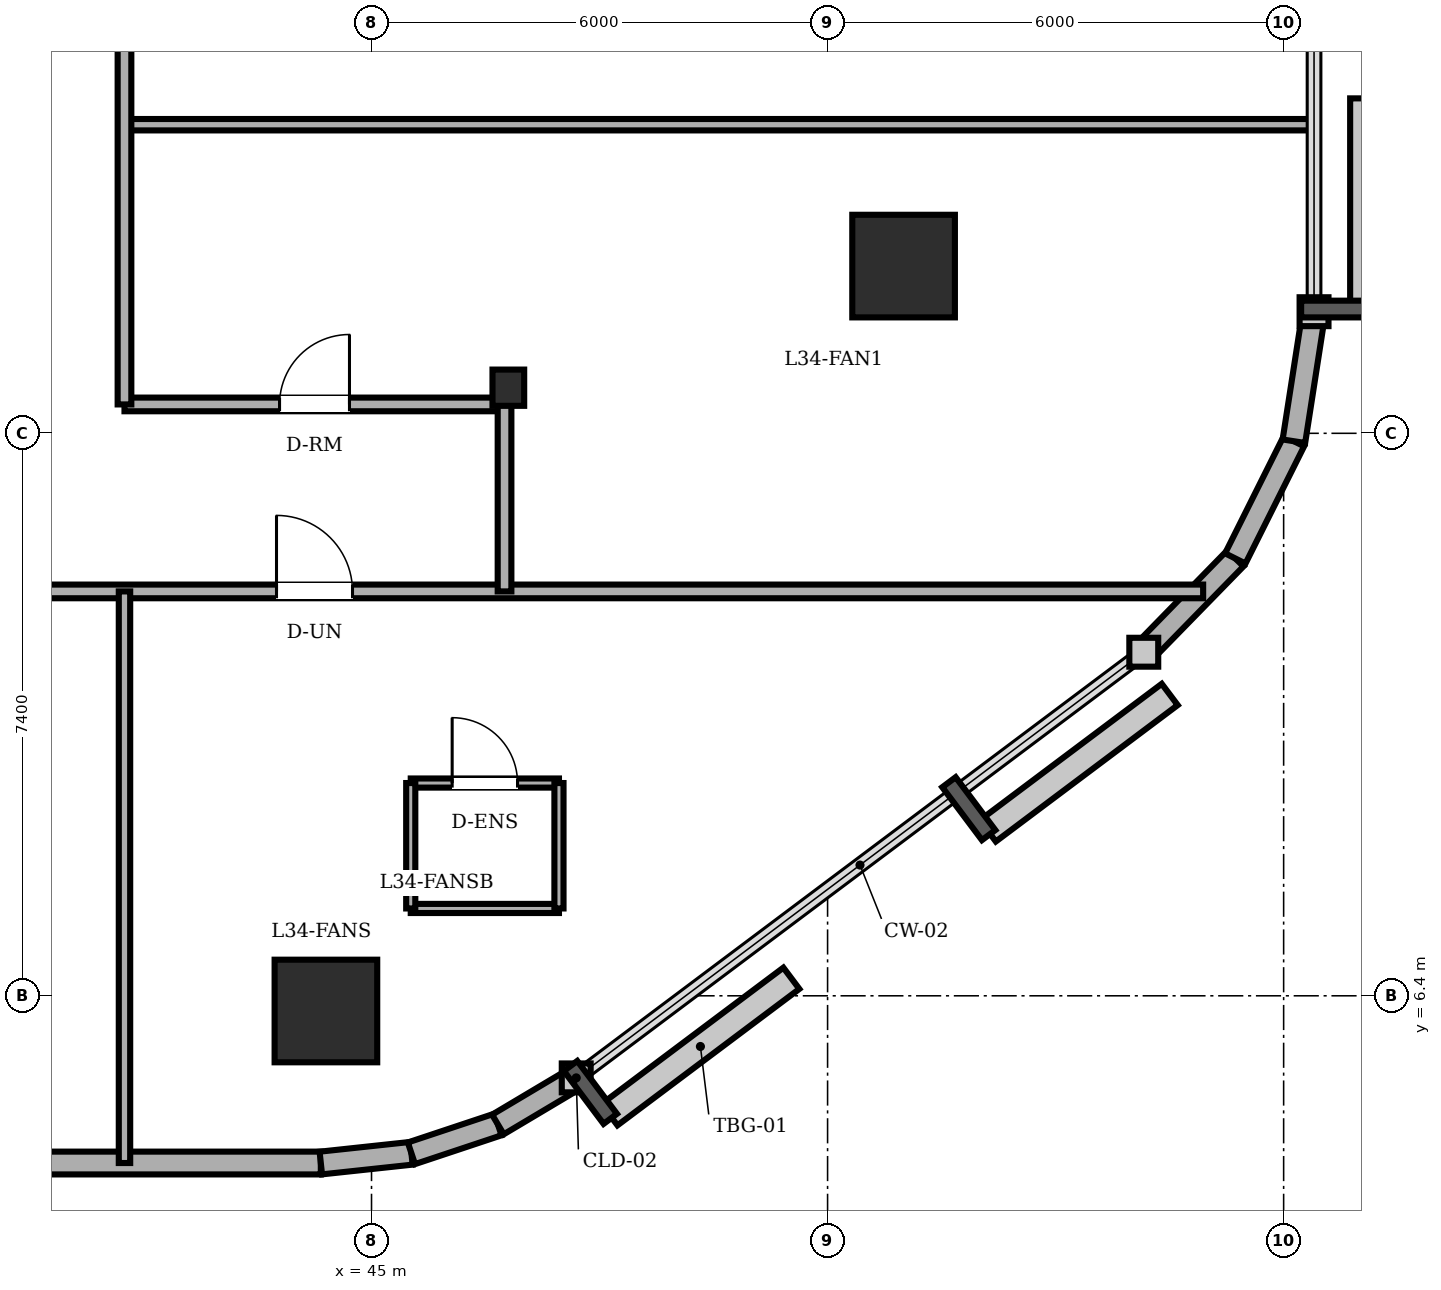
"""IFC4 building model, lengths in metres.
Left out: names, types, materials, properties, quantities, classifications, styles, units other than length and angle.
Written with IfcOpenShell. Run it as: python <this file> out.ifc"""

import sys

from ifc_helpers import new_model, si_unit, direction, frame, frame_2d, origin, origin_2d, place, context, subcontext, project, spatial, rectangle, circle, i_section, extrude, element, fill, save


model = new_model("IFC4")
c1 = context("Model", 3, precision=1e-05, world=origin(), true_north=direction((0.0, 1.0)))
c2 = subcontext(c1, "Body", "Model", "MODEL_VIEW")
j1 = project(units=[si_unit("LENGTHUNIT", "METRE"), si_unit("PLANEANGLEUNIT", "RADIAN")], contexts=[c1])
p1 = place(None, origin())
s1 = spatial("IfcSite", under=j1, at=p1, CompositionType="ELEMENT")
p2 = place(p1, origin())
s2 = spatial("IfcBuilding", under=s1, at=p2, CompositionType="ELEMENT")
p3 = place(p2, frame((0.0, 0.0, 129.5)))
s3 = spatial("IfcBuildingStorey", under=s2, at=p3, CompositionType="ELEMENT", Elevation=129.5)
for number, where, z_axis, x_axis in (
    (1, (44.4, 6.2, 0.0), (0.0, 0.0, 1.0), (1.0, 0.0, 0.0)),
    (2, (52.0, 16.0, 0.0), (0.0, 0.0, 1.0), (1.0, 0.0, 0.0)),
):
    element("IfcColumn", number, at=place(p3, frame(where, z_axis=z_axis, x_axis=x_axis)), inside=s3, PredefinedType="COLUMN", context=c2, shape_type="SweptSolid", body=[
        extrude(circle(Radius=0.675, at=origin_2d()), origin(), (0.0, 0.0, 1.0), 3.6),
    ])
p4 = place(p3, frame((46.8, 14.4, 0.0), z_axis=(0.0, 0.0, 1.0), x_axis=(1.0, 0.0, 0.0)))
e3 = element("IfcColumn", 3, at=p4, inside=s3, PredefinedType="COLUMN", context=c2, shape_type="SweptSolid", body=[
    extrude(i_section(OverallWidth=0.417, OverallDepth=0.477, WebThickness=0.036, FlangeThickness=0.057, FilletRadius=0.015, at=origin_2d()), origin(), (0.0, 0.0, 1.0), 3.6),
])
p5 = place(p3, frame((14.4, 4.2, 0.0), z_axis=(0.0, 0.0, 1.0), x_axis=(1.0, 0.0, 0.0)))
e4 = element("IfcWall", 4, at=p5, inside=s3, PredefinedType="SOLIDWALL", context=c2, shape_type="SweptSolid", body=[
    extrude(rectangle(XDim=29.933, YDim=0.3, at=frame_2d((14.967, 0.0))), origin(), (0.0, 0.0, 1.0), 3.36),
])
p6 = place(p5, frame((5.05, 0.0, 0.0)))
e5 = element("IfcOpeningElement", 5, at=p6, cuts=e4, PredefinedType="OPENING", context=c2, shape_type="SweptSolid", body=[
    extrude(rectangle(XDim=0.95, YDim=2.2, at=frame_2d((0.475, 1.1))), frame((0.0, 0.16, 0.0), z_axis=(0.0, -1.0, 0.0), x_axis=(1.0, 0.0, 0.0)), (0.0, 0.0, 1.0), 0.32),
])
p7 = place(p5, frame((2.808, 0.0, 0.85)))
e6 = element("IfcOpeningElement", 6, at=p7, cuts=e4, PredefinedType="OPENING", context=c2, shape_type="SweptSolid", body=[
    extrude(rectangle(XDim=1.65, YDim=1.55, at=frame_2d((0.825, 0.775))), frame((0.0, 0.16, 0.0), z_axis=(0.0, -1.0, 0.0), x_axis=(1.0, 0.0, 0.0)), (0.0, 0.0, 1.0), 0.32),
])
p8 = place(p5, frame((11.275, 0.0, 0.85)))
e7 = element("IfcOpeningElement", 7, at=p8, cuts=e4, PredefinedType="OPENING", context=c2, shape_type="SweptSolid", body=[
    extrude(rectangle(XDim=1.65, YDim=1.55, at=frame_2d((0.825, 0.775))), frame((0.0, 0.16, 0.0), z_axis=(0.0, -1.0, 0.0), x_axis=(1.0, 0.0, 0.0)), (0.0, 0.0, 1.0), 0.32),
])
p9 = place(p5, frame((17.625, 0.0, 0.85)))
e8 = element("IfcOpeningElement", 8, at=p9, cuts=e4, PredefinedType="OPENING", context=c2, shape_type="SweptSolid", body=[
    extrude(rectangle(XDim=1.65, YDim=1.55, at=frame_2d((0.825, 0.775))), frame((0.0, 0.16, 0.0), z_axis=(0.0, -1.0, 0.0), x_axis=(1.0, 0.0, 0.0)), (0.0, 0.0, 1.0), 0.32),
])
p10 = place(p5, frame((22.075, 0.0, 0.85)))
e9 = element("IfcOpeningElement", 9, at=p10, cuts=e4, PredefinedType="OPENING", context=c2, shape_type="SweptSolid", body=[
    extrude(rectangle(XDim=1.65, YDim=1.55, at=frame_2d((0.825, 0.775))), frame((0.0, 0.16, 0.0), z_axis=(0.0, -1.0, 0.0), x_axis=(1.0, 0.0, 0.0)), (0.0, 0.0, 1.0), 0.32),
])
p11 = place(p3, frame((44.333, 4.2, 0.0), z_axis=(0.0, 0.0, 1.0), x_axis=(0.994289103787, 0.106720092254, 0.0)))
e10 = element("IfcWall", 10, at=p11, inside=s3, PredefinedType="SOLIDWALL", context=c2, shape_type="SweptSolid", body=[
    extrude(rectangle(XDim=1.199, YDim=0.3, at=frame_2d((0.599, 0.0))), origin(), (0.0, 0.0, 1.0), 3.36),
])
p12 = place(p3, frame((45.525, 4.328, 0.0), z_axis=(0.0, 0.0, 1.0), x_axis=(0.948744332129, 0.316044604847, 0.0)))
e11 = element("IfcWall", 11, at=p12, inside=s3, PredefinedType="SOLIDWALL", context=c2, shape_type="SweptSolid", body=[
    extrude(rectangle(XDim=1.2, YDim=0.3, at=frame_2d((0.6, 0.0))), origin(), (0.0, 0.0, 1.0), 3.36),
])
p13 = place(p3, frame((46.663, 4.707, 0.0), z_axis=(0.0, 0.0, 1.0), x_axis=(0.859320591642, 0.511437308749, 0.0)))
e12 = element("IfcWall", 12, at=p13, inside=s3, PredefinedType="SOLIDWALL", context=c2, shape_type="SweptSolid", body=[
    extrude(rectangle(XDim=1.199, YDim=0.3, at=frame_2d((0.599, 0.0))), origin(), (0.0, 0.0, 1.0), 3.36),
])
for number, where, z_axis, x_axis in (
    (13, (55.16, 10.92, 0.0), (0.0, 0.0, 1.0), (0.698, 0.716, 0.0)),
    (14, (56.364, 12.154, 0.0), (0.0, 0.0, 1.0), (0.447, 0.894, 0.0)),
):
    element("IfcWall", number, at=place(p3, frame(where, z_axis=z_axis, x_axis=x_axis)), inside=s3, PredefinedType="SOLIDWALL", context=c2, shape_type="SweptSolid", body=[
        extrude(rectangle(XDim=1.724, YDim=0.3, at=frame_2d((0.862, 0.0))), origin(), (0.0, 0.0, 1.0), 3.36),
    ])
p14 = place(p3, frame((57.135, 13.696, 0.0), z_axis=(0.0, 0.0, 1.0), x_axis=(0.153620989032, 0.988129845581, 0.0)))
e15 = element("IfcWall", 15, at=p14, inside=s3, PredefinedType="SOLIDWALL", context=c2, shape_type="SweptSolid", body=[
    extrude(rectangle(XDim=1.724, YDim=0.3, at=frame_2d((0.862, 0.0))), origin(), (0.0, 0.0, 1.0), 3.36),
])
p15 = place(p3, frame((45.516, 9.199, 0.0), z_axis=(0.0, 0.0, 1.0), x_axis=(1.0, 0.0, 0.0)))
e16 = element("IfcWall", 16, at=p15, inside=s3, PredefinedType="PARTITIONING", context=c2, shape_type="SweptSolid", body=[
    extrude(rectangle(XDim=1.95, YDim=0.12, at=frame_2d((0.975, 0.0))), origin(), (0.0, 0.0, 1.0), 3.36),
])
p16 = place(p15, frame((0.545, 0.0, 0.0)))
e17 = element("IfcOpeningElement", 17, at=p16, cuts=e16, PredefinedType="OPENING", context=c2, shape_type="SweptSolid", body=[
    extrude(rectangle(XDim=0.86, YDim=2.1, at=frame_2d((0.43, 1.05))), frame((0.0, 0.07, 0.0), z_axis=(0.0, -1.0, 0.0), x_axis=(1.0, 0.0, 0.0)), (0.0, 0.0, 1.0), 0.14),
])
p17 = place(p3, frame((47.466, 7.549, 0.0), z_axis=(0.0, 0.0, 1.0), x_axis=(-1.0, 0.0, 0.0)))
e18 = element("IfcWall", 18, at=p17, inside=s3, PredefinedType="PARTITIONING", context=c2, shape_type="SweptSolid", body=[
    extrude(rectangle(XDim=1.95, YDim=0.12, at=frame_2d((0.975, 0.0))), origin(), (0.0, 0.0, 1.0), 3.36),
])
for number, where, z_axis, x_axis in (
    (19, (45.516, 9.199, 0.0), (0.0, 0.0, 1.0), (0.0, -1.0, 0.0)),
    (20, (47.466, 7.549, 0.0), (0.0, 0.0, 1.0), (0.0, 1.0, 0.0)),
):
    element("IfcWall", number, at=place(p3, frame(where, z_axis=z_axis, x_axis=x_axis)), inside=s3, PredefinedType="PARTITIONING", context=c2, shape_type="SweptSolid", body=[
        extrude(rectangle(XDim=1.65, YDim=0.12, at=frame_2d((0.825, 0.0))), origin(), (0.0, 0.0, 1.0), 3.36),
    ])
p18 = place(p3, frame((8.8, 11.72, 0.0), z_axis=(0.0, 0.0, 1.0), x_axis=(1.0, 0.0, 0.0)))
e21 = element("IfcWall", 21, at=p18, inside=s3, PredefinedType="PARTITIONING", context=c2, shape_type="SweptSolid", body=[
    extrude(rectangle(XDim=47.141, YDim=0.18, at=frame_2d((23.57, 0.0))), origin(), (0.0, 0.0, 1.0), 3.36),
])
p19 = place(p18, frame((17.24, 0.0, 0.0)))
e22 = element("IfcOpeningElement", 22, at=p19, cuts=e21, PredefinedType="OPENING", context=c2, shape_type="SweptSolid", body=[
    extrude(rectangle(XDim=0.92, YDim=2.1, at=frame_2d((0.46, 1.05))), frame((0.0, 0.1, 0.0), z_axis=(0.0, -1.0, 0.0), x_axis=(1.0, 0.0, 0.0)), (0.0, 0.0, 1.0), 0.2),
])
p20 = place(p18, frame((34.95, 0.0, 0.0)))
e23 = element("IfcOpeningElement", 23, at=p20, cuts=e21, PredefinedType="OPENING", context=c2, shape_type="SweptSolid", body=[
    extrude(rectangle(XDim=1.0, YDim=2.15, at=frame_2d((0.5, 1.075))), frame((0.0, 0.1, 0.0), z_axis=(0.0, -1.0, 0.0), x_axis=(1.0, 0.0, 0.0)), (0.0, 0.0, 1.0), 0.2),
])
p21 = place(p18, frame((8.04, 0.0, 0.0)))
e24 = element("IfcOpeningElement", 24, at=p21, cuts=e21, PredefinedType="OPENING", context=c2, shape_type="SweptSolid", body=[
    extrude(rectangle(XDim=0.92, YDim=2.1, at=frame_2d((0.46, 1.05))), frame((0.0, 0.1, 0.0), z_axis=(0.0, -1.0, 0.0), x_axis=(1.0, 0.0, 0.0)), (0.0, 0.0, 1.0), 0.2),
])
p22 = place(p18, frame((25.775, 0.0, 0.0)))
e25 = element("IfcOpeningElement", 25, at=p22, cuts=e21, PredefinedType="OPENING", context=c2, shape_type="SweptSolid", body=[
    extrude(rectangle(XDim=1.0, YDim=2.15, at=frame_2d((0.5, 1.075))), frame((0.0, 0.1, 0.0), z_axis=(0.0, -1.0, 0.0), x_axis=(1.0, 0.0, 0.0)), (0.0, 0.0, 1.0), 0.2),
])
p23 = place(p3, frame((41.75, 14.18, 0.0), z_axis=(0.0, 0.0, 1.0), x_axis=(1.0, 0.0, 0.0)))
e26 = element("IfcWall", 26, at=p23, inside=s3, PredefinedType="PARTITIONING", context=c2, shape_type="SweptSolid", body=[
    extrude(rectangle(XDim=5.0, YDim=0.18, at=frame_2d((2.5, 0.0))), origin(), (0.0, 0.0, 1.0), 2.842),
])
p24 = place(p23, frame((2.04, 0.0, 0.0)))
e27 = element("IfcOpeningElement", 27, at=p24, cuts=e26, PredefinedType="OPENING", context=c2, shape_type="SweptSolid", body=[
    extrude(rectangle(XDim=0.92, YDim=2.1, at=frame_2d((0.46, 1.05))), frame((0.0, 0.1, 0.0), z_axis=(0.0, -1.0, 0.0), x_axis=(1.0, 0.0, 0.0)), (0.0, 0.0, 1.0), 0.2),
])
p25 = place(p3, frame((41.75, 17.86, 0.0), z_axis=(0.0, 0.0, 1.0), x_axis=(1.0, 0.0, 0.0)))
e28 = element("IfcWall", 28, at=p25, inside=s3, PredefinedType="PARTITIONING", context=c2, shape_type="SweptSolid", body=[
    extrude(rectangle(XDim=15.65, YDim=0.15, at=frame_2d((7.825, 0.0))), origin(), (0.0, 0.0, 1.0), 3.36),
])
p26 = place(p3, frame((41.75, 4.2, 0.0), z_axis=(0.0, 0.0, 1.0), x_axis=(0.0, 1.0, 0.0)))
e29 = element("IfcWall", 29, at=p26, inside=s3, PredefinedType="PARTITIONING", context=c2, shape_type="SweptSolid", body=[
    extrude(rectangle(XDim=7.52, YDim=0.15, at=frame_2d((3.76, 0.0))), origin(), (0.0, 0.0, 1.0), 3.36),
])
p27 = place(p3, frame((41.75, 14.18, 0.0), z_axis=(0.0, 0.0, 1.0), x_axis=(0.0, 1.0, 0.0)))
e30 = element("IfcWall", 30, at=p27, inside=s3, PredefinedType="PARTITIONING", context=c2, shape_type="SweptSolid", body=[
    extrude(rectangle(XDim=19.64, YDim=0.18, at=frame_2d((9.82, 0.0))), origin(), (0.0, 0.0, 1.0), 3.36),
])
p28 = place(p27, frame((7.273, 0.0, 0.0)))
e31 = element("IfcOpeningElement", 31, at=p28, cuts=e30, PredefinedType="OPENING", context=c2, shape_type="SweptSolid", body=[
    extrude(rectangle(XDim=0.92, YDim=2.1, at=frame_2d((0.46, 1.05))), frame((0.0, 0.1, 0.0), z_axis=(0.0, -1.0, 0.0), x_axis=(1.0, 0.0, 0.0)), (0.0, 0.0, 1.0), 0.2),
])
p29 = place(p27, frame((13.412, 0.0, 0.0)))
e32 = element("IfcOpeningElement", 32, at=p29, cuts=e30, PredefinedType="OPENING", context=c2, shape_type="SweptSolid", body=[
    extrude(rectangle(XDim=0.92, YDim=2.1, at=frame_2d((0.46, 1.05))), frame((0.0, 0.1, 0.0), z_axis=(0.0, -1.0, 0.0), x_axis=(1.0, 0.0, 0.0)), (0.0, 0.0, 1.0), 0.2),
])
p30 = place(p3, frame((46.75, 11.72, 0.0), z_axis=(0.0, 0.0, 1.0), x_axis=(0.0, 1.0, 0.0)))
e33 = element("IfcWall", 33, at=p30, inside=s3, PredefinedType="PARTITIONING", context=c2, shape_type="SweptSolid", body=[
    extrude(rectangle(XDim=2.46, YDim=0.18, at=frame_2d((1.23, 0.0))), origin(), (0.0, 0.0, 1.0), 2.842),
])
p31 = place(p16, origin())
e34 = element("IfcDoor", 34, at=p31, inside=s3, OperationType="SINGLE_SWING_LEFT", PredefinedType="DOOR", context=c2, shape_type="SweptSolid", body=[
    extrude(rectangle(XDim=0.86, YDim=2.1, at=frame_2d((0.43, 1.05))), frame((0.0, 0.025, 0.0), z_axis=(0.0, -1.0, 0.0), x_axis=(1.0, 0.0, 0.0)), (0.0, 0.0, 1.0), 0.05),
])
fill(e17, e34)
p32 = place(p24, origin())
e35 = element("IfcDoor", 35, at=p32, inside=s3, OperationType="SINGLE_SWING_RIGHT", PredefinedType="DOOR", context=c2, shape_type="SweptSolid", body=[
    extrude(rectangle(XDim=0.92, YDim=2.1, at=frame_2d((0.46, 1.05))), frame((0.0, 0.025, 0.0), z_axis=(0.0, -1.0, 0.0), x_axis=(1.0, 0.0, 0.0)), (0.0, 0.0, 1.0), 0.05),
])
fill(e27, e35)
p33 = place(p20, origin())
e36 = element("IfcDoor", 36, at=p33, inside=s3, OperationType="SINGLE_SWING_LEFT", PredefinedType="DOOR", context=c2, shape_type="SweptSolid", body=[
    extrude(rectangle(XDim=1.0, YDim=2.15, at=frame_2d((0.5, 1.075))), frame((0.0, 0.025, 0.0), z_axis=(0.0, -1.0, 0.0), x_axis=(1.0, 0.0, 0.0)), (0.0, 0.0, 1.0), 0.05),
])
fill(e23, e36)
save(model, sys.argv[1])
